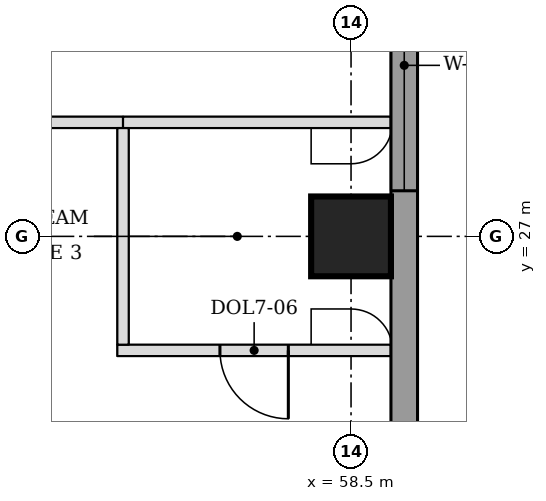
"""IFC4 building model, lengths in metres.
Left out: names, types, materials, properties, quantities, classifications, styles, units other than length and angle.
Written with IfcOpenShell. Run it as: python <this file> out.ifc"""

import sys

from ifc_helpers import new_model, si_unit, direction, frame, frame_2d, origin, origin_2d, place, context, subcontext, project, spatial, rectangle, extrude, element, fill, save


model = new_model("IFC4")
c1 = context("Model", 3, precision=1e-05, world=origin(), true_north=direction((0.0, 1.0)))
c2 = subcontext(c1, "Body", "Model", "MODEL_VIEW")
j1 = project(units=[si_unit("LENGTHUNIT", "METRE"), si_unit("PLANEANGLEUNIT", "RADIAN")], contexts=[c1])
p1 = place(None, origin())
s1 = spatial("IfcSite", under=j1, at=p1, CompositionType="ELEMENT")
p2 = place(p1, origin())
s2 = spatial("IfcBuilding", under=s1, at=p2, CompositionType="ELEMENT")
p3 = place(p2, frame((0.0, 0.0, 127.0)))
s3 = spatial("IfcBuildingStorey", under=s2, at=p3, CompositionType="ELEMENT", Elevation=127.0)
p4 = place(p3, frame((58.5, 27.0, 0.0), z_axis=(0.0, 0.0, 1.0), x_axis=(1.0, 0.0, 0.0)))
e1 = element("IfcColumn", 1, at=p4, inside=s3, PredefinedType="COLUMN", context=c2, shape_type="SweptSolid", body=[
    extrude(rectangle(XDim=1.05, YDim=1.05, at=origin_2d()), origin(), (0.0, 0.0, 1.0), 3.7),
])
p5 = place(p3, frame((59.2, 22.138, 0.0), z_axis=(0.0, 0.0, 1.0), x_axis=(0.0, 1.0, 0.0)))
e2 = element("IfcWall", 2, at=p5, inside=s3, PredefinedType="STANDARD", context=c2, shape_type="SweptSolid", body=[
    extrude(rectangle(XDim=17.837, YDim=0.35, at=frame_2d((8.919, 0.0))), origin(), (0.0, 0.0, 1.0), 3.525),
])
p6 = place(p5, frame((5.462, 0.0, 0.9)))
e3 = element("IfcOpeningElement", 3, at=p6, cuts=e2, PredefinedType="OPENING", context=c2, shape_type="SweptSolid", body=[
    extrude(rectangle(XDim=3.3, YDim=1.9, at=frame_2d((1.65, 0.95))), frame((0.0, 0.185, 0.0), z_axis=(0.0, -1.0, 0.0), x_axis=(1.0, 0.0, 0.0)), (0.0, 0.0, 1.0), 0.37),
])
p7 = place(p5, frame((14.037, 0.0, 0.9)))
e4 = element("IfcOpeningElement", 4, at=p7, cuts=e2, PredefinedType="OPENING", context=c2, shape_type="SweptSolid", body=[
    extrude(rectangle(XDim=3.3, YDim=1.9, at=frame_2d((1.65, 0.95))), frame((0.0, 0.185, 0.0), z_axis=(0.0, -1.0, 0.0), x_axis=(1.0, 0.0, 0.0)), (0.0, 0.0, 1.0), 0.37),
])
p8 = place(p3, frame((55.425, 25.5, 0.0), z_axis=(0.0, 0.0, 1.0), x_axis=(1.0, 0.0, 0.0)))
e5 = element("IfcWall", 5, at=p8, inside=s3, PredefinedType="PARTITIONING", context=c2, shape_type="SweptSolid", body=[
    extrude(rectangle(XDim=3.6, YDim=0.15, at=frame_2d((1.8, 0.0))), origin(), (0.0, 0.0, 1.0), 3.55),
])
p9 = place(p8, frame((1.35, 0.0, 0.0)))
e6 = element("IfcOpeningElement", 6, at=p9, cuts=e5, PredefinedType="OPENING", context=c2, shape_type="SweptSolid", body=[
    extrude(rectangle(XDim=0.9, YDim=2.1, at=frame_2d((0.45, 1.05))), frame((0.0, 0.085, 0.0), z_axis=(0.0, -1.0, 0.0), x_axis=(1.0, 0.0, 0.0)), (0.0, 0.0, 1.0), 0.17),
])
p10 = place(p3, frame((49.5, 28.5, 0.0), z_axis=(0.0, 0.0, 1.0), x_axis=(1.0, 0.0, 0.0)))
e7 = element("IfcWall", 7, at=p10, inside=s3, PredefinedType="PARTITIONING", context=c2, shape_type="SweptSolid", body=[
    extrude(rectangle(XDim=6.0, YDim=0.15, at=frame_2d((3.0, 0.0))), origin(), (0.0, 0.0, 1.0), 3.55),
])
p11 = place(p3, frame((55.5, 28.5, 0.0), z_axis=(0.0, 0.0, 1.0), x_axis=(1.0, 0.0, 0.0)))
e8 = element("IfcWall", 8, at=p11, inside=s3, PredefinedType="PARTITIONING", context=c2, shape_type="SweptSolid", body=[
    extrude(rectangle(XDim=3.525, YDim=0.15, at=frame_2d((1.762, 0.0))), origin(), (0.0, 0.0, 1.0), 3.55),
])
p12 = place(p3, frame((55.5, 25.575, 0.0), z_axis=(0.0, 0.0, 1.0), x_axis=(0.0, 1.0, 0.0)))
e9 = element("IfcWall", 9, at=p12, inside=s3, PredefinedType="PARTITIONING", context=c2, shape_type="SweptSolid", body=[
    extrude(rectangle(XDim=2.85, YDim=0.15, at=frame_2d((1.425, 0.0))), origin(), (0.0, 0.0, 1.0), 3.55),
])
p13 = place(p6, origin())
e10 = element("IfcWindow", 10, at=p13, inside=s3, PartitioningType="SINGLE_PANEL", PredefinedType="WINDOW", context=c2, shape_type="SweptSolid", body=[
    extrude(rectangle(XDim=3.3, YDim=1.9, at=frame_2d((1.65, 0.95))), frame((0.0, 0.085, 0.0), z_axis=(0.0, -1.0, 0.0), x_axis=(1.0, 0.0, 0.0)), (0.0, 0.0, 1.0), 0.06),
])
fill(e3, e10)
p14 = place(p9, frame((0.9, 0.0, 0.0), z_axis=(0.0, 0.0, 1.0), x_axis=(-1.0, 0.0, 0.0)))
e11 = element("IfcDoor", 11, at=p14, inside=s3, OperationType="SINGLE_SWING_LEFT", PredefinedType="DOOR", context=c2, shape_type="SweptSolid", body=[
    extrude(rectangle(XDim=0.9, YDim=2.1, at=frame_2d((0.45, 1.05))), frame((0.0, 0.025, 0.0), z_axis=(0.0, -1.0, 0.0), x_axis=(1.0, 0.0, 0.0)), (0.0, 0.0, 1.0), 0.05),
])
fill(e6, e11)
save(model, sys.argv[1])
